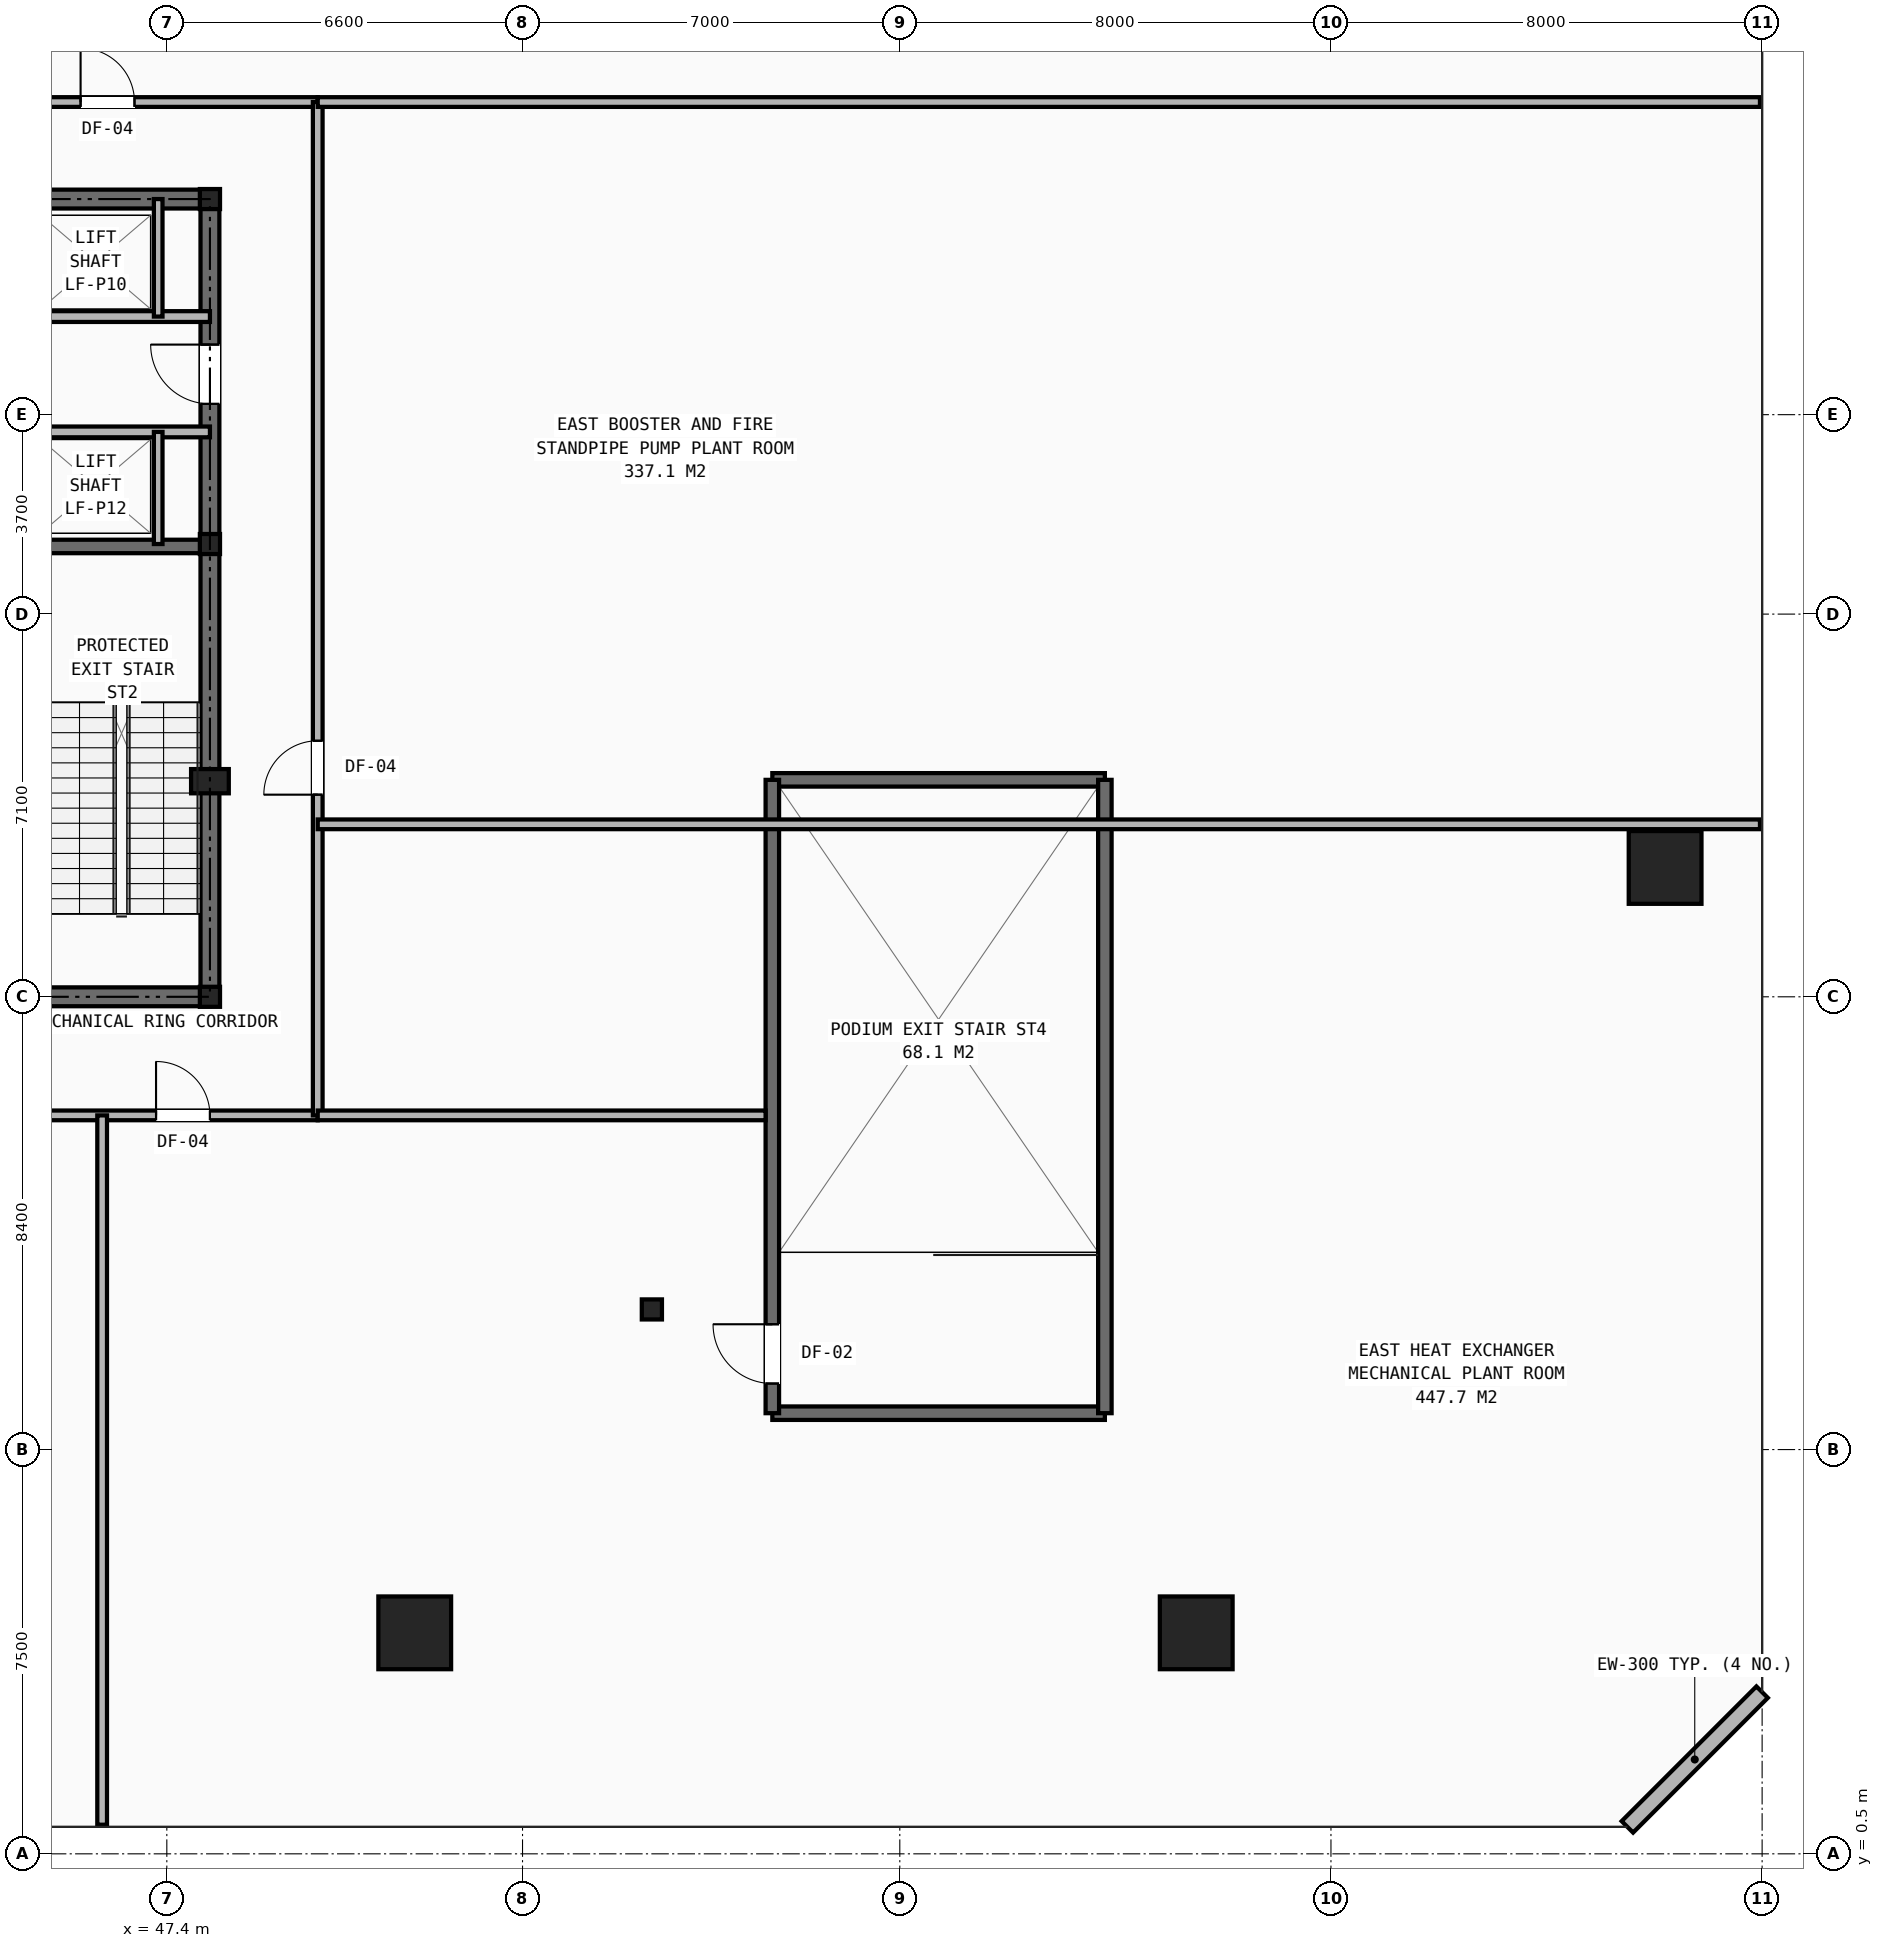
"""IFC4 building model, lengths in metres.
Left out: names, types, materials, properties, quantities, classifications, styles, units other than length and angle.
Written with IfcOpenShell. Run it as: python <this file> out.ifc"""

import sys

from ifc_helpers import new_model, si_unit, direction, frame, frame_2d, origin, origin_2d, place, context, subcontext, project, spatial, rectangle, hollow_rectangle, i_section, extrude, element, fill, save


model = new_model("IFC4")
c1 = context("Model", 3, precision=1e-05, world=origin(), true_north=direction((0.0, 1.0)))
c2 = subcontext(c1, "Body", "Model", "MODEL_VIEW")
j1 = project(units=[si_unit("LENGTHUNIT", "METRE"), si_unit("PLANEANGLEUNIT", "RADIAN")], contexts=[c1])
p1 = place(None, origin())
s1 = spatial("IfcSite", under=j1, at=p1, CompositionType="ELEMENT")
p2 = place(p1, origin())
s2 = spatial("IfcBuilding", under=s1, at=p2, CompositionType="ELEMENT")
p3 = place(p2, frame((0.0, 0.0, 22.0)))
s3 = spatial("IfcBuildingStorey", under=s2, at=p3, CompositionType="ELEMENT", Elevation=22.0)
for number, where, z_axis, x_axis in (
    (1, (48.2, 16.4, 0.0), (0.0, 0.0, 1.0), (1.0, 0.0, 0.0)),
    (2, (48.2, 24.8, 0.0), (0.0, 0.0, 1.0), (1.0, 0.0, 0.0)),
    (3, (48.2, 31.2, 0.0), (0.0, 0.0, 1.0), (1.0, 0.0, 0.0)),
    (4, (56.4, 10.6, 0.0), (0.0, 0.0, 1.0), (1.0, 0.0, 0.0)),
):
    element("IfcColumn", number, at=place(p3, frame(where, z_axis=z_axis, x_axis=x_axis)), inside=s3, PredefinedType="COLUMN", context=c2, shape_type="SweptSolid", body=[
        extrude(i_section(OverallWidth=0.374, OverallDepth=0.372, WebThickness=0.016, FlangeThickness=0.026, at=origin_2d()), origin(), (0.0, 0.0, 1.0), 5.2),
    ])
p4 = place(p3, frame((48.2, 20.4, 0.0), z_axis=(0.0, 0.0, 1.0), x_axis=(1.0, 0.0, 0.0)))
e5 = element("IfcColumn", 5, at=p4, inside=s3, PredefinedType="PILASTER", context=c2, shape_type="SweptSolid", body=[
    extrude(rectangle(XDim=0.7, YDim=0.45, at=origin_2d()), origin(), (0.0, 0.0, 1.0), 5.2),
])
for number, where, z_axis, x_axis in (
    (6, (52.0, 4.6, 0.0), (0.0, 0.0, 1.0), (1.0, 0.0, 0.0)),
    (7, (66.5, 4.6, 0.0), (0.0, 0.0, 1.0), (1.0, 0.0, 0.0)),
    (8, (75.2, 18.8, 0.0), (0.0, 0.0, 1.0), (1.0, 0.0, 0.0)),
):
    element("IfcColumn", number, at=place(p3, frame(where, z_axis=z_axis, x_axis=x_axis)), inside=s3, PredefinedType="COLUMN", context=c2, shape_type="SweptSolid", body=[
        extrude(hollow_rectangle(XDim=1.35, YDim=1.35, WallThickness=0.085, at=origin_2d()), origin(), (0.0, 0.0, 1.0), 5.2),
    ])
p5 = place(p3, frame((74.5, 1.0, 0.0), z_axis=(0.0, 0.0, 1.0), x_axis=(0.707106781187, 0.707106781187, 0.0)))
e9 = element("IfcWall", 9, at=p5, inside=s3, PredefinedType="STANDARD", context=c2, shape_type="SweptSolid", body=[
    extrude(rectangle(XDim=3.536, YDim=0.3, at=frame_2d((1.768, 0.0))), origin(), (0.0, 0.0, 1.0), 4.78),
])
p6 = place(p3, frame((31.8, 16.4, 0.0), z_axis=(0.0, 0.0, 1.0), x_axis=(1.0, 0.0, 0.0)))
e10 = element("IfcWall", 10, at=p6, inside=s3, PredefinedType="SHEAR", context=c2, shape_type="SweptSolid", body=[
    extrude(rectangle(XDim=16.4, YDim=0.35, at=frame_2d((8.2, 0.0))), origin(), (0.0, 0.0, 1.0), 4.78),
])
p7 = place(p6, frame((7.75, 0.0, 0.0)))
e11 = element("IfcOpeningElement", 11, at=p7, cuts=e10, PredefinedType="OPENING", context=c2, shape_type="SweptSolid", body=[
    extrude(rectangle(XDim=0.9, YDim=2.1, at=frame_2d((0.45, 1.05))), frame((0.0, 0.185, 0.0), z_axis=(0.0, -1.0, 0.0), x_axis=(1.0, 0.0, 0.0)), (0.0, 0.0, 1.0), 0.37),
])
p8 = place(p6, frame((4.2, 0.0, 0.0)))
e12 = element("IfcOpeningElement", 12, at=p8, cuts=e10, PredefinedType="OPENING", context=c2, shape_type="SweptSolid", body=[
    extrude(rectangle(XDim=0.95, YDim=2.1, at=frame_2d((0.475, 1.05))), frame((0.0, 0.185, 0.0), z_axis=(0.0, -1.0, 0.0), x_axis=(1.0, 0.0, 0.0)), (0.0, 0.0, 1.0), 0.37),
])
p9 = place(p6, frame((10.6, 0.0, 0.0)))
e13 = element("IfcOpeningElement", 13, at=p9, cuts=e10, PredefinedType="OPENING", context=c2, shape_type="SweptSolid", body=[
    extrude(rectangle(XDim=0.95, YDim=2.1, at=frame_2d((0.475, 1.05))), frame((0.0, 0.185, 0.0), z_axis=(0.0, -1.0, 0.0), x_axis=(1.0, 0.0, 0.0)), (0.0, 0.0, 1.0), 0.37),
])
p10 = place(p3, frame((31.8, 31.2, 0.0), z_axis=(0.0, 0.0, 1.0), x_axis=(1.0, 0.0, 0.0)))
e14 = element("IfcWall", 14, at=p10, inside=s3, PredefinedType="SHEAR", context=c2, shape_type="SweptSolid", body=[
    extrude(rectangle(XDim=16.4, YDim=0.35, at=frame_2d((8.2, 0.0))), origin(), (0.0, 0.0, 1.0), 4.78),
])
p11 = place(p3, frame((48.2, 16.4, 0.0), z_axis=(0.0, 0.0, 1.0), x_axis=(0.0, 1.0, 0.0)))
e15 = element("IfcWall", 15, at=p11, inside=s3, PredefinedType="SHEAR", context=c2, shape_type="SweptSolid", body=[
    extrude(rectangle(XDim=14.8, YDim=0.35, at=frame_2d((7.4, 0.0))), origin(), (0.0, 0.0, 1.0), 4.78),
])
p12 = place(p11, frame((11.0, 0.0, 0.0)))
e16 = element("IfcOpeningElement", 16, at=p12, cuts=e15, PredefinedType="OPENING", context=c2, shape_type="SweptSolid", body=[
    extrude(rectangle(XDim=1.1, YDim=2.15, at=frame_2d((0.55, 1.075))), frame((0.0, 0.185, 0.0), z_axis=(0.0, -1.0, 0.0), x_axis=(1.0, 0.0, 0.0)), (0.0, 0.0, 1.0), 0.37),
])
p13 = place(p3, frame((44.955, 24.755, 0.0), z_axis=(0.0, 0.0, 1.0), x_axis=(1.0, 0.0, 0.0)))
e17 = element("IfcWall", 17, at=p13, inside=s3, PredefinedType="SHEAR", context=c2, shape_type="SweptSolid", body=[
    extrude(rectangle(XDim=3.245, YDim=0.25, at=frame_2d((1.623, 0.0))), origin(), (0.0, 0.0, 1.0), 4.78),
])
p14 = place(p3, frame((31.8, 29.02, 0.0), z_axis=(0.0, 0.0, 1.0), x_axis=(1.0, 0.0, 0.0)))
e18 = element("IfcWall", 18, at=p14, inside=s3, PredefinedType="SOLIDWALL", context=c2, shape_type="SweptSolid", body=[
    extrude(rectangle(XDim=16.4, YDim=0.2, at=frame_2d((8.2, 0.0))), origin(), (0.0, 0.0, 1.0), 4.78),
])
p15 = place(p14, frame((0.55, 0.0, 0.0)))
e19 = element("IfcOpeningElement", 19, at=p15, cuts=e18, PredefinedType="OPENING", context=c2, shape_type="SweptSolid", body=[
    extrude(rectangle(XDim=0.85, YDim=2.05, at=frame_2d((0.425, 1.025))), frame((0.0, 0.11, 0.0), z_axis=(0.0, -1.0, 0.0), x_axis=(1.0, 0.0, 0.0)), (0.0, 0.0, 1.0), 0.22),
])
p16 = place(p3, frame((33.82, 26.88, 0.0), z_axis=(0.0, 0.0, 1.0), x_axis=(1.0, 0.0, 0.0)))
e20 = element("IfcWall", 20, at=p16, inside=s3, PredefinedType="SOLIDWALL", context=c2, shape_type="SweptSolid", body=[
    extrude(rectangle(XDim=14.38, YDim=0.2, at=frame_2d((7.19, 0.0))), origin(), (0.0, 0.0, 1.0), 4.78),
])
p17 = place(p3, frame((47.24, 29.02, 0.0), z_axis=(0.0, 0.0, 1.0), x_axis=(0.0, 1.0, 0.0)))
e21 = element("IfcWall", 21, at=p17, inside=s3, PredefinedType="SOLIDWALL", context=c2, shape_type="SweptSolid", body=[
    extrude(rectangle(XDim=2.18, YDim=0.16, at=frame_2d((1.09, 0.0))), origin(), (0.0, 0.0, 1.0), 2.52),
])
p18 = place(p3, frame((47.24, 24.8, 0.0), z_axis=(0.0, 0.0, 1.0), x_axis=(0.0, 1.0, 0.0)))
e22 = element("IfcWall", 22, at=p18, inside=s3, PredefinedType="SOLIDWALL", context=c2, shape_type="SweptSolid", body=[
    extrude(rectangle(XDim=2.08, YDim=0.16, at=frame_2d((1.04, 0.0))), origin(), (0.0, 0.0, 1.0), 4.78),
])
for number, where, z_axis, x_axis in (
    (23, (58.635, 20.425, 0.0), (0.0, 0.0, 1.0), (1.0, 0.0, 0.0)),
    (24, (58.635, 8.675, 0.0), (0.0, 0.0, 1.0), (1.0, 0.0, 0.0)),
):
    element("IfcWall", number, at=place(p3, frame(where, z_axis=z_axis, x_axis=x_axis)), inside=s3, PredefinedType="SHEAR", context=c2, shape_type="SweptSolid", body=[
        extrude(rectangle(XDim=6.17, YDim=0.25, at=frame_2d((3.085, 0.0))), origin(), (0.0, 0.0, 1.0), 4.78),
    ])
p19 = place(p3, frame((58.635, 8.675, 0.0), z_axis=(0.0, 0.0, 1.0), x_axis=(0.0, 1.0, 0.0)))
e25 = element("IfcWall", 25, at=p19, inside=s3, PredefinedType="SHEAR", context=c2, shape_type="SweptSolid", body=[
    extrude(rectangle(XDim=11.75, YDim=0.25, at=frame_2d((5.875, 0.0))), origin(), (0.0, 0.0, 1.0), 4.78),
])
p20 = place(p19, frame((0.55, 0.0, 0.0)))
e26 = element("IfcOpeningElement", 26, at=p20, cuts=e25, PredefinedType="OPENING", context=c2, shape_type="SweptSolid", body=[
    extrude(rectangle(XDim=1.1, YDim=2.15, at=frame_2d((0.55, 1.075))), frame((0.0, 0.135, 0.0), z_axis=(0.0, -1.0, 0.0), x_axis=(1.0, 0.0, 0.0)), (0.0, 0.0, 1.0), 0.27),
])
p21 = place(p3, frame((64.805, 8.675, 0.0), z_axis=(0.0, 0.0, 1.0), x_axis=(0.0, 1.0, 0.0)))
e27 = element("IfcWall", 27, at=p21, inside=s3, PredefinedType="SHEAR", context=c2, shape_type="SweptSolid", body=[
    extrude(rectangle(XDim=11.75, YDim=0.25, at=frame_2d((5.875, 0.0))), origin(), (0.0, 0.0, 1.0), 4.78),
])
p22 = place(p3, frame((29.8, 14.2, 0.0), z_axis=(0.0, 0.0, 1.0), x_axis=(1.0, 0.0, 0.0)))
e28 = element("IfcWall", 28, at=p22, inside=s3, PredefinedType="PARTITIONING", context=c2, shape_type="SweptSolid", body=[
    extrude(rectangle(XDim=20.4, YDim=0.18, at=frame_2d((10.2, 0.0))), origin(), (0.0, 0.0, 1.0), 2.52),
])
p23 = place(p22, frame((1.4, 0.0, 0.0)))
e29 = element("IfcOpeningElement", 29, at=p23, cuts=e28, PredefinedType="OPENING", context=c2, shape_type="SweptSolid", body=[
    extrude(rectangle(XDim=1.0, YDim=2.15, at=frame_2d((0.5, 1.075))), frame((0.0, 0.1, 0.0), z_axis=(0.0, -1.0, 0.0), x_axis=(1.0, 0.0, 0.0)), (0.0, 0.0, 1.0), 0.2),
])
p24 = place(p22, frame((5.4, 0.0, 0.0)))
e30 = element("IfcOpeningElement", 30, at=p24, cuts=e28, PredefinedType="OPENING", context=c2, shape_type="SweptSolid", body=[
    extrude(rectangle(XDim=1.0, YDim=2.15, at=frame_2d((0.5, 1.075))), frame((0.0, 0.1, 0.0), z_axis=(0.0, -1.0, 0.0), x_axis=(1.0, 0.0, 0.0)), (0.0, 0.0, 1.0), 0.2),
])
p25 = place(p22, frame((11.7, 0.0, 0.0)))
e31 = element("IfcOpeningElement", 31, at=p25, cuts=e28, PredefinedType="OPENING", context=c2, shape_type="SweptSolid", body=[
    extrude(rectangle(XDim=1.0, YDim=2.15, at=frame_2d((0.5, 1.075))), frame((0.0, 0.1, 0.0), z_axis=(0.0, -1.0, 0.0), x_axis=(1.0, 0.0, 0.0)), (0.0, 0.0, 1.0), 0.2),
])
p26 = place(p22, frame((17.4, 0.0, 0.0)))
e32 = element("IfcOpeningElement", 32, at=p26, cuts=e28, PredefinedType="OPENING", context=c2, shape_type="SweptSolid", body=[
    extrude(rectangle(XDim=1.0, YDim=2.15, at=frame_2d((0.5, 1.075))), frame((0.0, 0.1, 0.0), z_axis=(0.0, -1.0, 0.0), x_axis=(1.0, 0.0, 0.0)), (0.0, 0.0, 1.0), 0.2),
])
p27 = place(p3, frame((29.8, 33.0, 0.0), z_axis=(0.0, 0.0, 1.0), x_axis=(1.0, 0.0, 0.0)))
e33 = element("IfcWall", 33, at=p27, inside=s3, PredefinedType="PARTITIONING", context=c2, shape_type="SweptSolid", body=[
    extrude(rectangle(XDim=20.4, YDim=0.18, at=frame_2d((10.2, 0.0))), origin(), (0.0, 0.0, 1.0), 2.52),
])
p28 = place(p27, frame((3.4, 0.0, 0.0)))
e34 = element("IfcOpeningElement", 34, at=p28, cuts=e33, PredefinedType="OPENING", context=c2, shape_type="SweptSolid", body=[
    extrude(rectangle(XDim=1.0, YDim=2.15, at=frame_2d((0.5, 1.075))), frame((0.0, 0.1, 0.0), z_axis=(0.0, -1.0, 0.0), x_axis=(1.0, 0.0, 0.0)), (0.0, 0.0, 1.0), 0.2),
])
p29 = place(p27, frame((6.8, 0.0, 0.0)))
e35 = element("IfcOpeningElement", 35, at=p29, cuts=e33, PredefinedType="OPENING", context=c2, shape_type="SweptSolid", body=[
    extrude(rectangle(XDim=1.0, YDim=2.15, at=frame_2d((0.5, 1.075))), frame((0.0, 0.1, 0.0), z_axis=(0.0, -1.0, 0.0), x_axis=(1.0, 0.0, 0.0)), (0.0, 0.0, 1.0), 0.2),
])
p30 = place(p27, frame((11.4, 0.0, 0.0)))
e36 = element("IfcOpeningElement", 36, at=p30, cuts=e33, PredefinedType="OPENING", context=c2, shape_type="SweptSolid", body=[
    extrude(rectangle(XDim=1.0, YDim=2.15, at=frame_2d((0.5, 1.075))), frame((0.0, 0.1, 0.0), z_axis=(0.0, -1.0, 0.0), x_axis=(1.0, 0.0, 0.0)), (0.0, 0.0, 1.0), 0.2),
])
p31 = place(p27, frame((16.0, 0.0, 0.0)))
e37 = element("IfcOpeningElement", 37, at=p31, cuts=e33, PredefinedType="OPENING", context=c2, shape_type="SweptSolid", body=[
    extrude(rectangle(XDim=1.0, YDim=2.15, at=frame_2d((0.5, 1.075))), frame((0.0, 0.1, 0.0), z_axis=(0.0, -1.0, 0.0), x_axis=(1.0, 0.0, 0.0)), (0.0, 0.0, 1.0), 0.2),
])
p32 = place(p3, frame((50.2, 14.2, 0.0), z_axis=(0.0, 0.0, 1.0), x_axis=(0.0, 1.0, 0.0)))
e38 = element("IfcWall", 38, at=p32, inside=s3, PredefinedType="PARTITIONING", context=c2, shape_type="SweptSolid", body=[
    extrude(rectangle(XDim=18.8, YDim=0.18, at=frame_2d((9.4, 0.0))), origin(), (0.0, 0.0, 1.0), 2.52),
])
p33 = place(p32, frame((5.95, 0.0, 0.0)))
e39 = element("IfcOpeningElement", 39, at=p33, cuts=e38, PredefinedType="OPENING", context=c2, shape_type="SweptSolid", body=[
    extrude(rectangle(XDim=1.0, YDim=2.15, at=frame_2d((0.5, 1.075))), frame((0.0, 0.1, 0.0), z_axis=(0.0, -1.0, 0.0), x_axis=(1.0, 0.0, 0.0)), (0.0, 0.0, 1.0), 0.2),
])
for number, where, z_axis, x_axis in (
    (40, (50.2, 19.6, 0.0), (0.0, 0.0, 1.0), (1.0, 0.0, 0.0)),
    (41, (50.2, 33.0, 0.0), (0.0, 0.0, 1.0), (1.0, 0.0, 0.0)),
):
    element("IfcWall", number, at=place(p3, frame(where, z_axis=z_axis, x_axis=x_axis)), inside=s3, PredefinedType="PARTITIONING", context=c2, shape_type="SweptSolid", body=[
        extrude(rectangle(XDim=26.76, YDim=0.18, at=frame_2d((13.38, 0.0))), origin(), (0.0, 0.0, 1.0), 2.52),
    ])
p34 = place(p3, frame((46.2, 1.04, 0.0), z_axis=(0.0, 0.0, 1.0), x_axis=(0.0, 1.0, 0.0)))
e42 = element("IfcWall", 42, at=p34, inside=s3, PredefinedType="PARTITIONING", context=c2, shape_type="SweptSolid", body=[
    extrude(rectangle(XDim=13.16, YDim=0.18, at=frame_2d((6.58, 0.0))), origin(), (0.0, 0.0, 1.0), 2.52),
])
p35 = place(p3, frame((50.2, 14.2, 0.0), z_axis=(0.0, 0.0, 1.0), x_axis=(1.0, 0.0, 0.0)))
e43 = element("IfcWall", 43, at=p35, inside=s3, PredefinedType="PARTITIONING", context=c2, shape_type="SweptSolid", body=[
    extrude(rectangle(XDim=8.31, YDim=0.18, at=frame_2d((4.155, 0.0))), origin(), (0.0, 0.0, 1.0), 2.52),
])
p36 = place(p12, origin())
e44 = element("IfcDoor", 44, at=p36, inside=s3, OperationType="SINGLE_SWING_RIGHT", PredefinedType="DOOR", context=c2, shape_type="SweptSolid", body=[
    extrude(rectangle(XDim=1.1, YDim=2.15, at=frame_2d((0.55, 1.075))), frame((0.0, 0.025, 0.0), z_axis=(0.0, -1.0, 0.0), x_axis=(1.0, 0.0, 0.0)), (0.0, 0.0, 1.0), 0.05),
])
fill(e16, e44)
p37 = place(p26, origin())
e45 = element("IfcDoor", 45, at=p37, inside=s3, OperationType="SINGLE_SWING_LEFT", PredefinedType="DOOR", context=c2, shape_type="SweptSolid", body=[
    extrude(rectangle(XDim=1.0, YDim=2.15, at=frame_2d((0.5, 1.075))), frame((0.0, 0.025, 0.0), z_axis=(0.0, -1.0, 0.0), x_axis=(1.0, 0.0, 0.0)), (0.0, 0.0, 1.0), 0.05),
])
fill(e32, e45)
p38 = place(p33, origin())
e46 = element("IfcDoor", 46, at=p38, inside=s3, OperationType="SINGLE_SWING_LEFT", PredefinedType="DOOR", context=c2, shape_type="SweptSolid", body=[
    extrude(rectangle(XDim=1.0, YDim=2.15, at=frame_2d((0.5, 1.075))), frame((0.0, 0.025, 0.0), z_axis=(0.0, -1.0, 0.0), x_axis=(1.0, 0.0, 0.0)), (0.0, 0.0, 1.0), 0.05),
])
fill(e39, e46)
p39 = place(p31, origin())
e47 = element("IfcDoor", 47, at=p39, inside=s3, OperationType="SINGLE_SWING_LEFT", PredefinedType="DOOR", context=c2, shape_type="SweptSolid", body=[
    extrude(rectangle(XDim=1.0, YDim=2.15, at=frame_2d((0.5, 1.075))), frame((0.0, 0.025, 0.0), z_axis=(0.0, -1.0, 0.0), x_axis=(1.0, 0.0, 0.0)), (0.0, 0.0, 1.0), 0.05),
])
fill(e37, e47)
p40 = place(p20, origin())
e48 = element("IfcDoor", 48, at=p40, inside=s3, OperationType="SINGLE_SWING_RIGHT", PredefinedType="DOOR", context=c2, shape_type="SweptSolid", body=[
    extrude(rectangle(XDim=1.1, YDim=2.15, at=frame_2d((0.55, 1.075))), frame((0.0, 0.025, 0.0), z_axis=(0.0, -1.0, 0.0), x_axis=(1.0, 0.0, 0.0)), (0.0, 0.0, 1.0), 0.05),
])
fill(e26, e48)
save(model, sys.argv[1])
